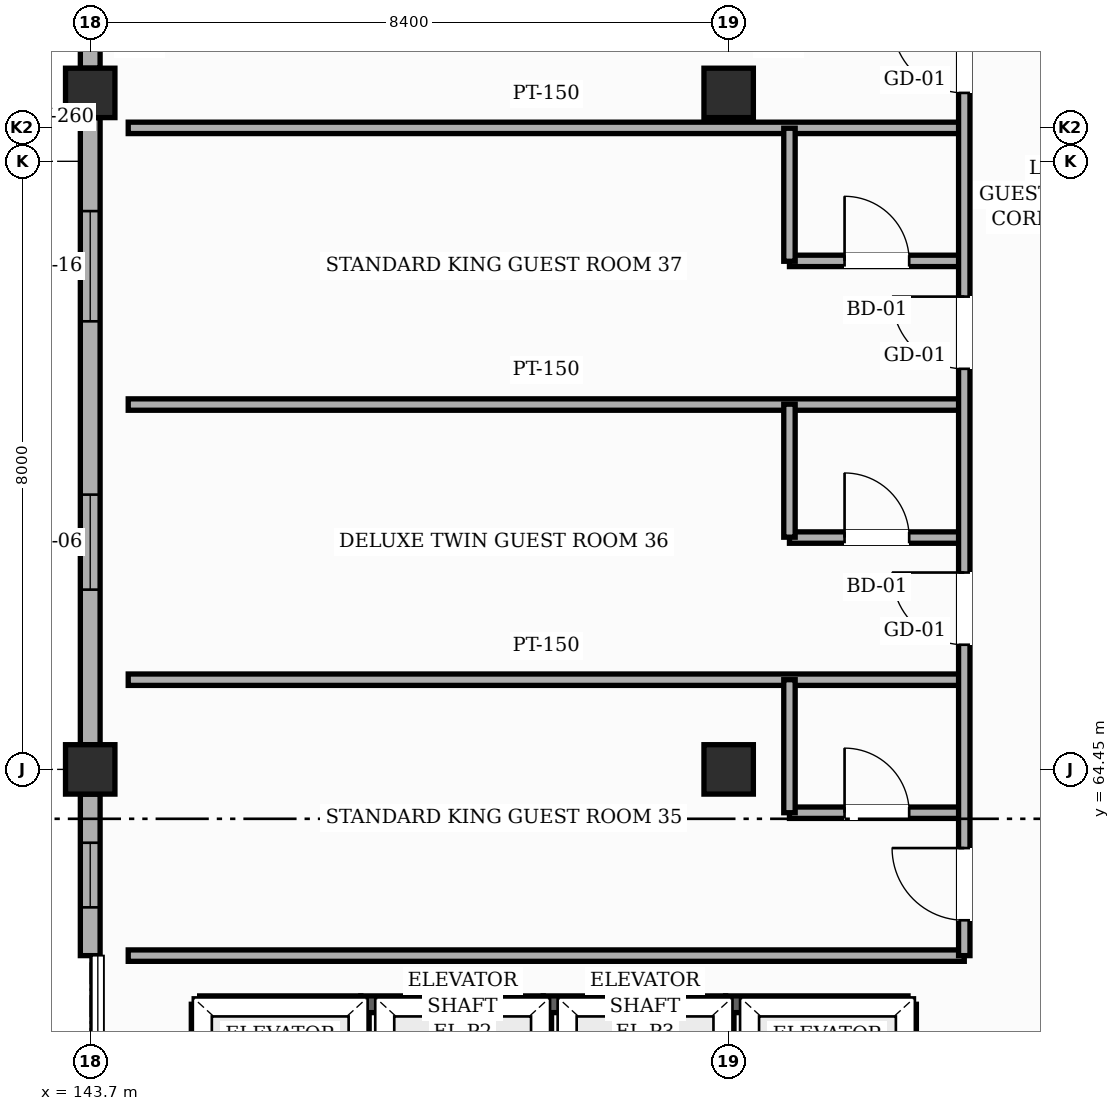
"""IFC4 building model, lengths in metres.
Left out: names, types, materials, properties, quantities, classifications, styles, units other than length and angle.
Written with IfcOpenShell. Run it as: python <this file> out.ifc"""

import sys

from ifc_helpers import new_model, si_unit, direction, frame, frame_2d, origin, origin_2d, place, context, subcontext, project, spatial, rectangle, hollow_rectangle, extrude, element, fill, save


model = new_model("IFC4")
c1 = context("Model", 3, precision=1e-05, world=origin(), true_north=direction((0.0, 1.0)))
c2 = subcontext(c1, "Body", "Model", "MODEL_VIEW")
j1 = project(units=[si_unit("LENGTHUNIT", "METRE"), si_unit("PLANEANGLEUNIT", "RADIAN")], contexts=[c1])
p1 = place(None, origin())
s1 = spatial("IfcSite", under=j1, at=p1, CompositionType="ELEMENT")
p2 = place(p1, origin())
s2 = spatial("IfcBuilding", under=s1, at=p2, CompositionType="ELEMENT")
p3 = place(p2, frame((0.0, 0.0, 19.8)))
s3 = spatial("IfcBuildingStorey", under=s2, at=p3, CompositionType="ELEMENT", Elevation=19.8)
for number, where, z_axis, x_axis in (
    (1, (143.7, 64.45, 0.0), (0.0, 0.0, 1.0), (1.0, 0.0, 0.0)),
    (2, (143.7, 73.35, 0.0), (0.0, 0.0, 1.0), (1.0, 0.0, 0.0)),
):
    element("IfcColumn", number, at=place(p3, frame(where, z_axis=z_axis, x_axis=x_axis)), inside=s3, PredefinedType="COLUMN", context=c2, shape_type="SweptSolid", body=[
        extrude(hollow_rectangle(XDim=0.65, YDim=0.65, WallThickness=0.025, InnerFilletRadius=0.025, OuterFilletRadius=0.05, at=origin_2d()), origin(), (0.0, 0.0, 1.0), 4.8),
    ])
p4 = place(p3, frame((152.1, 64.45, -0.24), z_axis=(0.0, 0.0, 1.0), x_axis=(1.0, 0.0, 0.0)))
e3 = element("IfcColumn", 3, at=p4, inside=s3, PredefinedType="COLUMN", context=c2, shape_type="SweptSolid", body=[
    extrude(hollow_rectangle(XDim=0.65, YDim=0.65, WallThickness=0.025, InnerFilletRadius=0.025, OuterFilletRadius=0.05, at=origin_2d()), origin(), (0.0, 0.0, 1.0), 5.04),
])
p5 = place(p3, frame((152.1, 73.35, 0.0), z_axis=(0.0, 0.0, 1.0), x_axis=(1.0, 0.0, 0.0)))
e4 = element("IfcColumn", 4, at=p5, inside=s3, PredefinedType="COLUMN", context=c2, shape_type="SweptSolid", body=[
    extrude(hollow_rectangle(XDim=0.65, YDim=0.65, WallThickness=0.025, InnerFilletRadius=0.025, OuterFilletRadius=0.05, at=origin_2d()), origin(), (0.0, 0.0, 1.0), 4.8),
])
p6 = place(p3, frame((143.7, 62.0, 0.0), z_axis=(0.0, 0.0, 1.0), x_axis=(0.0, 1.0, 0.0)))
e5 = element("IfcWall", 5, at=p6, inside=s3, PredefinedType="SOLIDWALL", context=c2, shape_type="SweptSolid", body=[
    extrude(rectangle(XDim=2.125, YDim=0.26, at=frame_2d((1.062, 0.0))), origin(), (0.0, 0.0, 1.0), 4.005),
])
p7 = place(p6, frame((0.635, 0.0, 0.85)))
e6 = element("IfcOpeningElement", 6, at=p7, cuts=e5, PredefinedType="OPENING", context=c2, shape_type="SweptSolid", body=[
    extrude(rectangle(XDim=0.85, YDim=1.35, at=frame_2d((0.425, 0.675))), frame((0.0, 0.14, 0.0), z_axis=(0.0, -1.0, 0.0), x_axis=(1.0, 0.0, 0.0)), (0.0, 0.0, 1.0), 0.28),
])
p8 = place(p3, frame((143.7, 64.775, 0.0), z_axis=(0.0, 0.0, 1.0), x_axis=(0.0, 1.0, 0.0)))
e7 = element("IfcWall", 7, at=p8, inside=s3, PredefinedType="SOLIDWALL", context=c2, shape_type="SweptSolid", body=[
    extrude(rectangle(XDim=8.25, YDim=0.26, at=frame_2d((4.125, 0.0))), origin(), (0.0, 0.0, 1.0), 3.855),
])
p9 = place(p8, frame((2.04, 0.0, 0.85)))
e8 = element("IfcOpeningElement", 8, at=p9, cuts=e7, PredefinedType="OPENING", context=c2, shape_type="SweptSolid", body=[
    extrude(rectangle(XDim=1.25, YDim=1.35, at=frame_2d((0.625, 0.675))), frame((0.0, 0.14, 0.0), z_axis=(0.0, -1.0, 0.0), x_axis=(1.0, 0.0, 0.0)), (0.0, 0.0, 1.0), 0.28),
])
p10 = place(p8, frame((5.57, 0.0, 0.85)))
e9 = element("IfcOpeningElement", 9, at=p10, cuts=e7, PredefinedType="OPENING", context=c2, shape_type="SweptSolid", body=[
    extrude(rectangle(XDim=1.45, YDim=1.35, at=frame_2d((0.725, 0.675))), frame((0.0, 0.14, 0.0), z_axis=(0.0, -1.0, 0.0), x_axis=(1.0, 0.0, 0.0)), (0.0, 0.0, 1.0), 0.28),
])
p11 = place(p3, frame((143.7, 73.675, 0.0), z_axis=(0.0, 0.0, 1.0), x_axis=(0.0, 1.0, 0.0)))
e10 = element("IfcWall", 10, at=p11, inside=s3, PredefinedType="SOLIDWALL", context=c2, shape_type="SweptSolid", body=[
    extrude(rectangle(XDim=6.9, YDim=0.26, at=frame_2d((3.45, 0.0))), origin(), (0.0, 0.0, 1.0), 4.005),
])
p12 = place(p11, frame((0.595, 0.0, 0.85)))
e11 = element("IfcOpeningElement", 11, at=p12, cuts=e10, PredefinedType="OPENING", context=c2, shape_type="SweptSolid", body=[
    extrude(rectangle(XDim=1.65, YDim=1.35, at=frame_2d((0.825, 0.675))), frame((0.0, 0.14, 0.0), z_axis=(0.0, -1.0, 0.0), x_axis=(1.0, 0.0, 0.0)), (0.0, 0.0, 1.0), 0.28),
])
p13 = place(p11, frame((3.73, 0.0, 0.85)))
e12 = element("IfcOpeningElement", 12, at=p13, cuts=e10, PredefinedType="OPENING", context=c2, shape_type="SweptSolid", body=[
    extrude(rectangle(XDim=1.85, YDim=1.35, at=frame_2d((0.925, 0.675))), frame((0.0, 0.14, 0.0), z_axis=(0.0, -1.0, 0.0), x_axis=(1.0, 0.0, 0.0)), (0.0, 0.0, 1.0), 0.28),
])
p14 = place(p3, frame((145.14, 61.36, 0.0), z_axis=(0.0, 0.0, 1.0), x_axis=(1.0, 0.0, 0.0)))
e13 = element("IfcWall", 13, at=p14, inside=s3, PredefinedType="SHEAR", context=c2, shape_type="SweptSolid", body=[
    extrude(rectangle(XDim=2.12, YDim=0.22, at=frame_2d((1.06, 0.0))), origin(), (0.0, 0.0, 1.0), 4.58),
])
for number, where, z_axis, x_axis in (
    (14, (147.26, 59.44, 0.0), (0.0, 0.0, 1.0), (0.0, 1.0, 0.0)),
    (15, (145.14, 59.44, 0.0), (0.0, 0.0, 1.0), (0.0, 1.0, 0.0)),
):
    element("IfcWall", number, at=place(p3, frame(where, z_axis=z_axis, x_axis=x_axis)), inside=s3, PredefinedType="SHEAR", context=c2, shape_type="SweptSolid", body=[
        extrude(rectangle(XDim=1.92, YDim=0.22, at=frame_2d((0.96, 0.0))), origin(), (0.0, 0.0, 1.0), 4.58),
    ])
p15 = place(p3, frame((147.26, 61.36, 0.0), z_axis=(0.0, 0.0, 1.0), x_axis=(1.0, 0.0, 0.0)))
e16 = element("IfcWall", 16, at=p15, inside=s3, PredefinedType="SHEAR", context=c2, shape_type="SweptSolid", body=[
    extrude(rectangle(XDim=2.4, YDim=0.22, at=frame_2d((1.2, 0.0))), origin(), (0.0, 0.0, 1.0), 4.58),
])
p16 = place(p3, frame((149.66, 59.44, 0.0), z_axis=(0.0, 0.0, 1.0), x_axis=(0.0, 1.0, 0.0)))
e17 = element("IfcWall", 17, at=p16, inside=s3, PredefinedType="SHEAR", context=c2, shape_type="SweptSolid", body=[
    extrude(rectangle(XDim=1.92, YDim=0.22, at=frame_2d((0.96, 0.0))), origin(), (0.0, 0.0, 1.0), 4.58),
])
p17 = place(p3, frame((149.66, 61.36, 0.0), z_axis=(0.0, 0.0, 1.0), x_axis=(1.0, 0.0, 0.0)))
e18 = element("IfcWall", 18, at=p17, inside=s3, PredefinedType="SHEAR", context=c2, shape_type="SweptSolid", body=[
    extrude(rectangle(XDim=2.4, YDim=0.22, at=frame_2d((1.2, 0.0))), origin(), (0.0, 0.0, 1.0), 4.58),
])
p18 = place(p3, frame((152.06, 59.44, 0.0), z_axis=(0.0, 0.0, 1.0), x_axis=(0.0, 1.0, 0.0)))
e19 = element("IfcWall", 19, at=p18, inside=s3, PredefinedType="SHEAR", context=c2, shape_type="SweptSolid", body=[
    extrude(rectangle(XDim=1.92, YDim=0.22, at=frame_2d((0.96, 0.0))), origin(), (0.0, 0.0, 1.0), 4.58),
])
p19 = place(p3, frame((152.06, 61.36, 0.0), z_axis=(0.0, 0.0, 1.0), x_axis=(1.0, 0.0, 0.0)))
e20 = element("IfcWall", 20, at=p19, inside=s3, PredefinedType="SHEAR", context=c2, shape_type="SweptSolid", body=[
    extrude(rectangle(XDim=2.4, YDim=0.22, at=frame_2d((1.2, 0.0))), origin(), (0.0, 0.0, 1.0), 4.58),
])
p20 = place(p3, frame((154.46, 59.44, 0.0), z_axis=(0.0, 0.0, 1.0), x_axis=(0.0, 1.0, 0.0)))
e21 = element("IfcWall", 21, at=p20, inside=s3, PredefinedType="SHEAR", context=c2, shape_type="SweptSolid", body=[
    extrude(rectangle(XDim=1.92, YDim=0.22, at=frame_2d((0.96, 0.0))), origin(), (0.0, 0.0, 1.0), 4.58),
])
p21 = place(p3, frame((144.2, 62.0, 0.0), z_axis=(0.0, 0.0, 1.0), x_axis=(1.0, 0.0, 0.0)))
e22 = element("IfcWall", 22, at=p21, inside=s3, PredefinedType="PARTITIONING", context=c2, shape_type="SweptSolid", body=[
    extrude(rectangle(XDim=11.0, YDim=0.15, at=frame_2d((5.5, 0.0))), origin(), (0.0, 0.0, 1.0), 4.565),
])
p22 = place(p3, frame((152.9, 63.88, 0.0), z_axis=(0.0, 0.0, 1.0), x_axis=(1.0, 0.0, 0.0)))
e23 = element("IfcWall", 23, at=p22, inside=s3, PredefinedType="PARTITIONING", context=c2, shape_type="SweptSolid", body=[
    extrude(rectangle(XDim=2.3, YDim=0.15, at=frame_2d((1.15, 0.0))), origin(), (0.0, 0.0, 1.0), 4.565),
])
p23 = place(p22, frame((0.725, 0.0, 0.0)))
e24 = element("IfcOpeningElement", 24, at=p23, cuts=e23, PredefinedType="OPENING", context=c2, shape_type="SweptSolid", body=[
    extrude(rectangle(XDim=0.85, YDim=2.1, at=frame_2d((0.425, 1.05))), frame((0.0, 0.085, 0.0), z_axis=(0.0, -1.0, 0.0), x_axis=(1.0, 0.0, 0.0)), (0.0, 0.0, 1.0), 0.17),
])
p24 = place(p3, frame((144.2, 65.63, 0.0), z_axis=(0.0, 0.0, 1.0), x_axis=(1.0, 0.0, 0.0)))
e25 = element("IfcWall", 25, at=p24, inside=s3, PredefinedType="PARTITIONING", context=c2, shape_type="SweptSolid", body=[
    extrude(rectangle(XDim=11.0, YDim=0.15, at=frame_2d((5.5, 0.0))), origin(), (0.0, 0.0, 1.0), 4.565),
])
p25 = place(p3, frame((152.9, 67.5, 0.0), z_axis=(0.0, 0.0, 1.0), x_axis=(1.0, 0.0, 0.0)))
e26 = element("IfcWall", 26, at=p25, inside=s3, PredefinedType="PARTITIONING", context=c2, shape_type="SweptSolid", body=[
    extrude(rectangle(XDim=2.3, YDim=0.15, at=frame_2d((1.15, 0.0))), origin(), (0.0, 0.0, 1.0), 4.565),
])
p26 = place(p25, frame((0.725, 0.0, 0.0)))
e27 = element("IfcOpeningElement", 27, at=p26, cuts=e26, PredefinedType="OPENING", context=c2, shape_type="SweptSolid", body=[
    extrude(rectangle(XDim=0.85, YDim=2.1, at=frame_2d((0.425, 1.05))), frame((0.0, 0.085, 0.0), z_axis=(0.0, -1.0, 0.0), x_axis=(1.0, 0.0, 0.0)), (0.0, 0.0, 1.0), 0.17),
])
p27 = place(p3, frame((144.2, 69.25, 0.0), z_axis=(0.0, 0.0, 1.0), x_axis=(1.0, 0.0, 0.0)))
e28 = element("IfcWall", 28, at=p27, inside=s3, PredefinedType="PARTITIONING", context=c2, shape_type="SweptSolid", body=[
    extrude(rectangle(XDim=11.0, YDim=0.15, at=frame_2d((5.5, 0.0))), origin(), (0.0, 0.0, 1.0), 4.565),
])
p28 = place(p3, frame((152.9, 71.14, 0.0), z_axis=(0.0, 0.0, 1.0), x_axis=(1.0, 0.0, 0.0)))
e29 = element("IfcWall", 29, at=p28, inside=s3, PredefinedType="PARTITIONING", context=c2, shape_type="SweptSolid", body=[
    extrude(rectangle(XDim=2.3, YDim=0.15, at=frame_2d((1.15, 0.0))), origin(), (0.0, 0.0, 1.0), 4.565),
])
p29 = place(p28, frame((0.725, 0.0, 0.0)))
e30 = element("IfcOpeningElement", 30, at=p29, cuts=e29, PredefinedType="OPENING", context=c2, shape_type="SweptSolid", body=[
    extrude(rectangle(XDim=0.85, YDim=2.1, at=frame_2d((0.425, 1.05))), frame((0.0, 0.085, 0.0), z_axis=(0.0, -1.0, 0.0), x_axis=(1.0, 0.0, 0.0)), (0.0, 0.0, 1.0), 0.17),
])
p30 = place(p3, frame((144.2, 72.89, 0.0), z_axis=(0.0, 0.0, 1.0), x_axis=(1.0, 0.0, 0.0)))
e31 = element("IfcWall", 31, at=p30, inside=s3, PredefinedType="PARTITIONING", context=c2, shape_type="SweptSolid", body=[
    extrude(rectangle(XDim=11.0, YDim=0.15, at=frame_2d((5.5, 0.0))), origin(), (0.0, 0.0, 1.0), 4.565),
])
for number, where, z_axis, x_axis in (
    (32, (152.9, 63.88, 0.0), (0.0, 0.0, 1.0), (0.0, 1.0, 0.0)),
    (33, (152.9, 67.505, 0.0), (0.0, 0.0, 1.0), (0.0, 1.0, 0.0)),
    (34, (152.9, 71.135, 0.0), (0.0, 0.0, 1.0), (0.0, 1.0, 0.0)),
):
    element("IfcWall", number, at=place(p3, frame(where, z_axis=z_axis, x_axis=x_axis)), inside=s3, PredefinedType="PARTITIONING", context=c2, shape_type="SweptSolid", body=[
        extrude(rectangle(XDim=1.75, YDim=0.15, at=frame_2d((0.875, 0.0))), origin(), (0.0, 0.0, 1.0), 4.565),
    ])
p31 = place(p3, frame((155.2, 62.0, 0.0), z_axis=(0.0, 0.0, 1.0), x_axis=(0.0, 1.0, 0.0)))
e35 = element("IfcWall", 35, at=p31, inside=s3, PredefinedType="PARTITIONING", context=c2, shape_type="SweptSolid", body=[
    extrude(rectangle(XDim=50.8, YDim=0.15, at=frame_2d((25.4, 0.0))), origin(), (0.0, 0.0, 1.0), 4.565),
])
p32 = place(p31, frame((0.465, 0.0, 0.0)))
e36 = element("IfcOpeningElement", 36, at=p32, cuts=e35, PredefinedType="OPENING", context=c2, shape_type="SweptSolid", body=[
    extrude(rectangle(XDim=0.95, YDim=2.15, at=frame_2d((0.475, 1.075))), frame((0.0, 0.085, 0.0), z_axis=(0.0, -1.0, 0.0), x_axis=(1.0, 0.0, 0.0)), (0.0, 0.0, 1.0), 0.17),
])
p33 = place(p31, frame((4.09, 0.0, 0.0)))
e37 = element("IfcOpeningElement", 37, at=p33, cuts=e35, PredefinedType="OPENING", context=c2, shape_type="SweptSolid", body=[
    extrude(rectangle(XDim=0.95, YDim=2.15, at=frame_2d((0.475, 1.075))), frame((0.0, 0.085, 0.0), z_axis=(0.0, -1.0, 0.0), x_axis=(1.0, 0.0, 0.0)), (0.0, 0.0, 1.0), 0.17),
])
p34 = place(p31, frame((7.72, 0.0, 0.0)))
e38 = element("IfcOpeningElement", 38, at=p34, cuts=e35, PredefinedType="OPENING", context=c2, shape_type="SweptSolid", body=[
    extrude(rectangle(XDim=0.95, YDim=2.15, at=frame_2d((0.475, 1.075))), frame((0.0, 0.085, 0.0), z_axis=(0.0, -1.0, 0.0), x_axis=(1.0, 0.0, 0.0)), (0.0, 0.0, 1.0), 0.17),
])
p35 = place(p31, frame((11.35, 0.0, 0.0)))
e39 = element("IfcOpeningElement", 39, at=p35, cuts=e35, PredefinedType="OPENING", context=c2, shape_type="SweptSolid", body=[
    extrude(rectangle(XDim=0.95, YDim=2.15, at=frame_2d((0.475, 1.075))), frame((0.0, 0.085, 0.0), z_axis=(0.0, -1.0, 0.0), x_axis=(1.0, 0.0, 0.0)), (0.0, 0.0, 1.0), 0.17),
])
p36 = place(p31, frame((14.98, 0.0, 0.0)))
e40 = element("IfcOpeningElement", 40, at=p36, cuts=e35, PredefinedType="OPENING", context=c2, shape_type="SweptSolid", body=[
    extrude(rectangle(XDim=0.95, YDim=2.15, at=frame_2d((0.475, 1.075))), frame((0.0, 0.085, 0.0), z_axis=(0.0, -1.0, 0.0), x_axis=(1.0, 0.0, 0.0)), (0.0, 0.0, 1.0), 0.17),
])
p37 = place(p31, frame((18.61, 0.0, 0.0)))
e41 = element("IfcOpeningElement", 41, at=p37, cuts=e35, PredefinedType="OPENING", context=c2, shape_type="SweptSolid", body=[
    extrude(rectangle(XDim=0.95, YDim=2.15, at=frame_2d((0.475, 1.075))), frame((0.0, 0.085, 0.0), z_axis=(0.0, -1.0, 0.0), x_axis=(1.0, 0.0, 0.0)), (0.0, 0.0, 1.0), 0.17),
])
p38 = place(p31, frame((22.235, 0.0, 0.0)))
e42 = element("IfcOpeningElement", 42, at=p38, cuts=e35, PredefinedType="OPENING", context=c2, shape_type="SweptSolid", body=[
    extrude(rectangle(XDim=0.95, YDim=2.15, at=frame_2d((0.475, 1.075))), frame((0.0, 0.085, 0.0), z_axis=(0.0, -1.0, 0.0), x_axis=(1.0, 0.0, 0.0)), (0.0, 0.0, 1.0), 0.17),
])
p39 = place(p31, frame((25.865, 0.0, 0.0)))
e43 = element("IfcOpeningElement", 43, at=p39, cuts=e35, PredefinedType="OPENING", context=c2, shape_type="SweptSolid", body=[
    extrude(rectangle(XDim=0.95, YDim=2.15, at=frame_2d((0.475, 1.075))), frame((0.0, 0.085, 0.0), z_axis=(0.0, -1.0, 0.0), x_axis=(1.0, 0.0, 0.0)), (0.0, 0.0, 1.0), 0.17),
])
p40 = place(p31, frame((29.49, 0.0, 0.0)))
e44 = element("IfcOpeningElement", 44, at=p40, cuts=e35, PredefinedType="OPENING", context=c2, shape_type="SweptSolid", body=[
    extrude(rectangle(XDim=0.95, YDim=2.15, at=frame_2d((0.475, 1.075))), frame((0.0, 0.085, 0.0), z_axis=(0.0, -1.0, 0.0), x_axis=(1.0, 0.0, 0.0)), (0.0, 0.0, 1.0), 0.17),
])
p41 = place(p31, frame((33.12, 0.0, 0.0)))
e45 = element("IfcOpeningElement", 45, at=p41, cuts=e35, PredefinedType="OPENING", context=c2, shape_type="SweptSolid", body=[
    extrude(rectangle(XDim=0.95, YDim=2.15, at=frame_2d((0.475, 1.075))), frame((0.0, 0.085, 0.0), z_axis=(0.0, -1.0, 0.0), x_axis=(1.0, 0.0, 0.0)), (0.0, 0.0, 1.0), 0.17),
])
p42 = place(p31, frame((36.75, 0.0, 0.0)))
e46 = element("IfcOpeningElement", 46, at=p42, cuts=e35, PredefinedType="OPENING", context=c2, shape_type="SweptSolid", body=[
    extrude(rectangle(XDim=0.95, YDim=2.15, at=frame_2d((0.475, 1.075))), frame((0.0, 0.085, 0.0), z_axis=(0.0, -1.0, 0.0), x_axis=(1.0, 0.0, 0.0)), (0.0, 0.0, 1.0), 0.17),
])
p43 = place(p31, frame((40.38, 0.0, 0.0)))
e47 = element("IfcOpeningElement", 47, at=p43, cuts=e35, PredefinedType="OPENING", context=c2, shape_type="SweptSolid", body=[
    extrude(rectangle(XDim=0.95, YDim=2.15, at=frame_2d((0.475, 1.075))), frame((0.0, 0.085, 0.0), z_axis=(0.0, -1.0, 0.0), x_axis=(1.0, 0.0, 0.0)), (0.0, 0.0, 1.0), 0.17),
])
p44 = place(p31, frame((44.01, 0.0, 0.0)))
e48 = element("IfcOpeningElement", 48, at=p44, cuts=e35, PredefinedType="OPENING", context=c2, shape_type="SweptSolid", body=[
    extrude(rectangle(XDim=0.95, YDim=2.15, at=frame_2d((0.475, 1.075))), frame((0.0, 0.085, 0.0), z_axis=(0.0, -1.0, 0.0), x_axis=(1.0, 0.0, 0.0)), (0.0, 0.0, 1.0), 0.17),
])
p45 = place(p31, frame((47.635, 0.0, 0.0)))
e49 = element("IfcOpeningElement", 49, at=p45, cuts=e35, PredefinedType="OPENING", context=c2, shape_type="SweptSolid", body=[
    extrude(rectangle(XDim=0.95, YDim=2.15, at=frame_2d((0.475, 1.075))), frame((0.0, 0.085, 0.0), z_axis=(0.0, -1.0, 0.0), x_axis=(1.0, 0.0, 0.0)), (0.0, 0.0, 1.0), 0.17),
])
p46 = place(p7, origin())
e50 = element("IfcWindow", 50, at=p46, inside=s3, PartitioningType="SINGLE_PANEL", PredefinedType="WINDOW", context=c2, shape_type="SweptSolid", body=[
    extrude(rectangle(XDim=0.85, YDim=1.35, at=frame_2d((0.425, 0.675))), frame((0.0, 0.03, 0.0), z_axis=(0.0, -1.0, 0.0), x_axis=(1.0, 0.0, 0.0)), (0.0, 0.0, 1.0), 0.06),
])
fill(e6, e50)
p47 = place(p9, origin())
e51 = element("IfcWindow", 51, at=p47, inside=s3, PartitioningType="SINGLE_PANEL", PredefinedType="WINDOW", context=c2, shape_type="SweptSolid", body=[
    extrude(rectangle(XDim=1.25, YDim=1.35, at=frame_2d((0.625, 0.675))), frame((0.0, 0.03, 0.0), z_axis=(0.0, -1.0, 0.0), x_axis=(1.0, 0.0, 0.0)), (0.0, 0.0, 1.0), 0.06),
])
fill(e8, e51)
p48 = place(p10, origin())
e52 = element("IfcWindow", 52, at=p48, inside=s3, PartitioningType="SINGLE_PANEL", PredefinedType="WINDOW", context=c2, shape_type="SweptSolid", body=[
    extrude(rectangle(XDim=1.45, YDim=1.35, at=frame_2d((0.725, 0.675))), frame((0.0, 0.03, 0.0), z_axis=(0.0, -1.0, 0.0), x_axis=(1.0, 0.0, 0.0)), (0.0, 0.0, 1.0), 0.06),
])
fill(e9, e52)
p49 = place(p32, origin())
e53 = element("IfcDoor", 53, at=p49, inside=s3, OperationType="SINGLE_SWING_RIGHT", PredefinedType="DOOR", context=c2, shape_type="SweptSolid", body=[
    extrude(rectangle(XDim=0.95, YDim=2.15, at=frame_2d((0.475, 1.075))), frame((0.0, 0.025, 0.0), z_axis=(0.0, -1.0, 0.0), x_axis=(1.0, 0.0, 0.0)), (0.0, 0.0, 1.0), 0.05),
])
fill(e36, e53)
p50 = place(p23, origin())
e54 = element("IfcDoor", 54, at=p50, inside=s3, OperationType="SINGLE_SWING_LEFT", PredefinedType="DOOR", context=c2, shape_type="SweptSolid", body=[
    extrude(rectangle(XDim=0.85, YDim=2.1, at=frame_2d((0.425, 1.05))), frame((0.0, 0.025, 0.0), z_axis=(0.0, -1.0, 0.0), x_axis=(1.0, 0.0, 0.0)), (0.0, 0.0, 1.0), 0.05),
])
fill(e24, e54)
p51 = place(p33, origin())
e55 = element("IfcDoor", 55, at=p51, inside=s3, OperationType="SINGLE_SWING_RIGHT", PredefinedType="DOOR", context=c2, shape_type="SweptSolid", body=[
    extrude(rectangle(XDim=0.95, YDim=2.15, at=frame_2d((0.475, 1.075))), frame((0.0, 0.025, 0.0), z_axis=(0.0, -1.0, 0.0), x_axis=(1.0, 0.0, 0.0)), (0.0, 0.0, 1.0), 0.05),
])
fill(e37, e55)
p52 = place(p26, origin())
e56 = element("IfcDoor", 56, at=p52, inside=s3, OperationType="SINGLE_SWING_LEFT", PredefinedType="DOOR", context=c2, shape_type="SweptSolid", body=[
    extrude(rectangle(XDim=0.85, YDim=2.1, at=frame_2d((0.425, 1.05))), frame((0.0, 0.025, 0.0), z_axis=(0.0, -1.0, 0.0), x_axis=(1.0, 0.0, 0.0)), (0.0, 0.0, 1.0), 0.05),
])
fill(e27, e56)
p53 = place(p34, origin())
e57 = element("IfcDoor", 57, at=p53, inside=s3, OperationType="SINGLE_SWING_RIGHT", PredefinedType="DOOR", context=c2, shape_type="SweptSolid", body=[
    extrude(rectangle(XDim=0.95, YDim=2.15, at=frame_2d((0.475, 1.075))), frame((0.0, 0.025, 0.0), z_axis=(0.0, -1.0, 0.0), x_axis=(1.0, 0.0, 0.0)), (0.0, 0.0, 1.0), 0.05),
])
fill(e38, e57)
p54 = place(p29, origin())
e58 = element("IfcDoor", 58, at=p54, inside=s3, OperationType="SINGLE_SWING_LEFT", PredefinedType="DOOR", context=c2, shape_type="SweptSolid", body=[
    extrude(rectangle(XDim=0.85, YDim=2.1, at=frame_2d((0.425, 1.05))), frame((0.0, 0.025, 0.0), z_axis=(0.0, -1.0, 0.0), x_axis=(1.0, 0.0, 0.0)), (0.0, 0.0, 1.0), 0.05),
])
fill(e30, e58)
p55 = place(p35, origin())
e59 = element("IfcDoor", 59, at=p55, inside=s3, OperationType="SINGLE_SWING_RIGHT", PredefinedType="DOOR", context=c2, shape_type="SweptSolid", body=[
    extrude(rectangle(XDim=0.95, YDim=2.15, at=frame_2d((0.475, 1.075))), frame((0.0, 0.025, 0.0), z_axis=(0.0, -1.0, 0.0), x_axis=(1.0, 0.0, 0.0)), (0.0, 0.0, 1.0), 0.05),
])
fill(e39, e59)
save(model, sys.argv[1])
